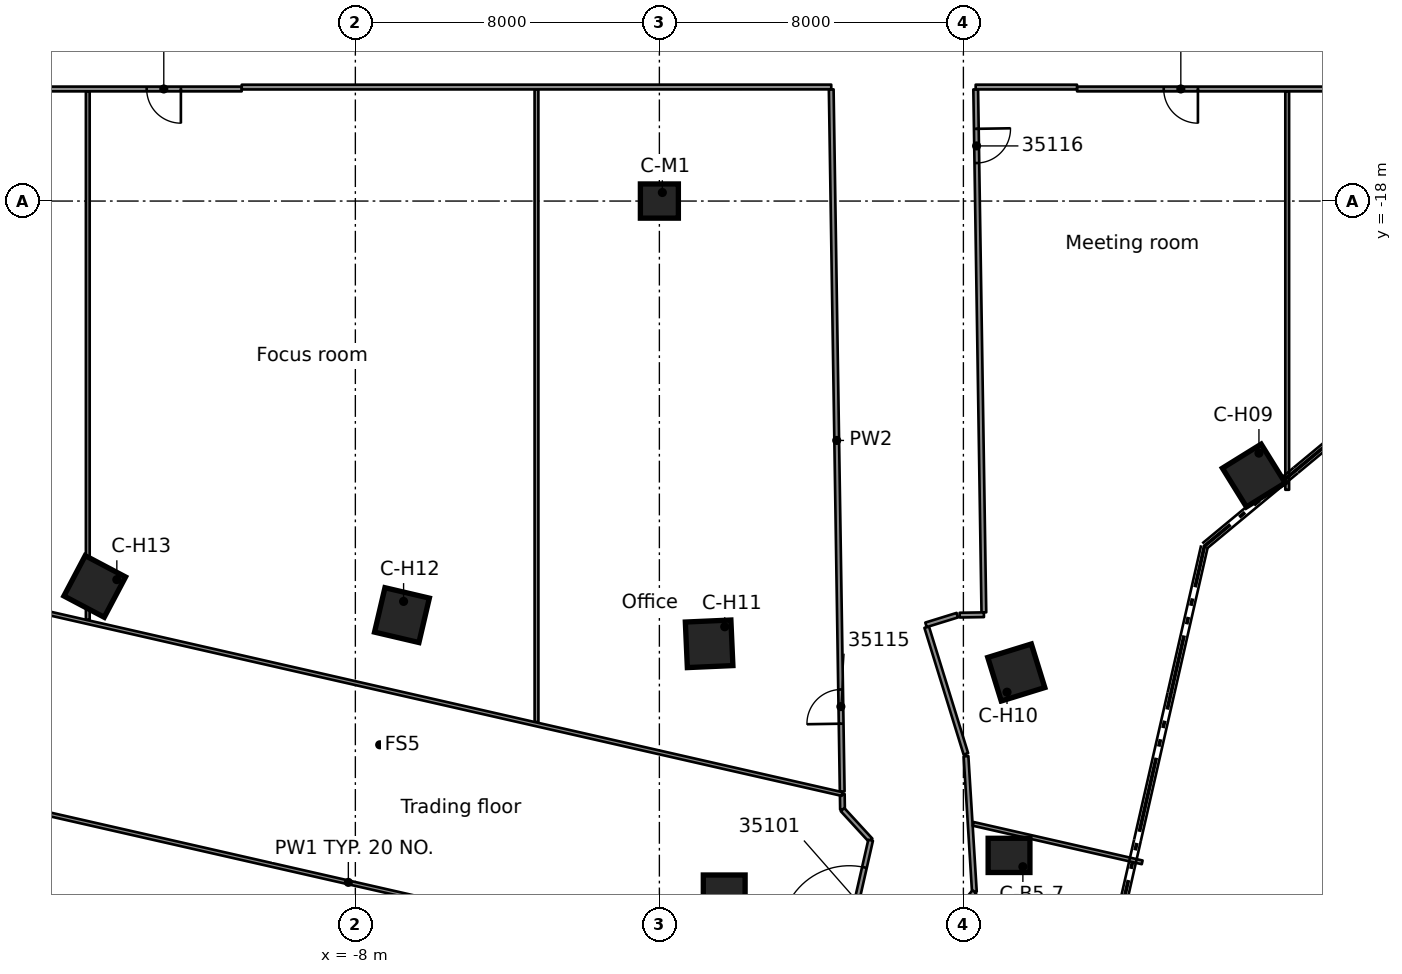
"""IFC4 building model, lengths in metres.
Left out: names, types, materials, properties, quantities, classifications, styles, units other than length and angle.
Written with IfcOpenShell. Run it as: python <this file> out.ifc"""

import sys

from ifc_helpers import new_model, si_unit, direction, frame, frame_2d, origin, origin_2d, place, context, subcontext, project, spatial, rectangle, extrude, element, fill, save


model = new_model("IFC4")
c1 = context("Model", 3, precision=1e-05, world=origin(), true_north=direction((0.0, 1.0)))
c2 = subcontext(c1, "Body", "Model", "MODEL_VIEW")
j1 = project(units=[si_unit("LENGTHUNIT", "METRE"), si_unit("PLANEANGLEUNIT", "RADIAN")], contexts=[c1])
p1 = place(None, origin())
s1 = spatial("IfcSite", under=j1, at=p1, CompositionType="ELEMENT")
p2 = place(p1, origin())
s2 = spatial("IfcBuilding", under=s1, at=p2, CompositionType="ELEMENT")
p3 = place(p2, frame((0.0, 0.0, 170.6)))
s3 = spatial("IfcBuildingStorey", under=s2, at=p3, CompositionType="ELEMENT", Elevation=170.6)
for number, where, z_axis, x_axis in (
    (1, (1.706, -36.183, 0.0), (0.0, 0.0, 1.0), (1.0, 0.0, 0.0)),
    (2, (9.201, -35.217, 0.0), (0.0, 0.0, 1.0), (1.0, 0.0, 0.0)),
):
    element("IfcColumn", number, at=place(p3, frame(where, z_axis=z_axis, x_axis=x_axis)), inside=s3, PredefinedType="COLUMN", context=c2, shape_type="SweptSolid", body=[
        extrude(rectangle(XDim=1.1, YDim=0.9, at=origin_2d()), origin(), (0.0, 0.0, 1.0), 3.5),
    ])
for number, where, z_axis, x_axis in (
    (3, (15.642, -25.222, 0.0), (0.0, 0.0, 1.0), (0.527, -0.85, 0.0)),
    (4, (9.392, -30.405, 0.0), (0.0, 0.0, 1.0), (0.295, -0.955, 0.0)),
    (5, (1.309, -29.65, 0.0), (0.0, 0.0, 1.0), (0.044, -0.999, 0.0)),
    (6, (-6.774, -28.895, 0.0), (0.0, 0.0, 1.0), (-0.228, -0.974, 0.0)),
    (7, (-14.858, -28.141, 0.0), (0.0, 0.0, 1.0), (-0.467, -0.884, 0.0)),
):
    element("IfcColumn", number, at=place(p3, frame(where, z_axis=z_axis, x_axis=x_axis)), inside=s3, PredefinedType="COLUMN", context=c2, shape_type="SweptSolid", body=[
        extrude(rectangle(XDim=1.2, YDim=1.2, at=origin_2d()), origin(), (0.0, 0.0, 1.0), 3.5),
    ])
p4 = place(p3, frame((0.0, -18.0, 0.0), z_axis=(0.0, 0.0, 1.0), x_axis=(1.0, 0.0, 0.0)))
e8 = element("IfcColumn", 8, at=p4, inside=s3, PredefinedType="COLUMN", context=c2, shape_type="SweptSolid", body=[
    extrude(rectangle(XDim=1.0, YDim=0.9, at=origin_2d()), origin(), (0.0, 0.0, 1.0), 3.5),
])
p5 = place(p3, frame((-3.234, -15.062, 0.0), z_axis=(0.0, 0.0, 1.0), x_axis=(5.8673394e-05, -0.999999998279, 0.0)))
e9 = element("IfcWall", 9, at=p5, inside=s3, PredefinedType="PARTITIONING", context=c2, shape_type="SweptSolid", body=[
    extrude(rectangle(XDim=16.644, YDim=0.1, at=frame_2d((8.322, 0.0))), origin(), (0.0, 0.0, 1.0), 3.06),
])
p6 = place(p3, frame((4.813, -33.602, 0.0), z_axis=(0.0, 0.0, 1.0), x_axis=(0.014888165056, -0.999889165128, 0.0)))
e10 = element("IfcWall", 10, at=p6, inside=s3, PredefinedType="PARTITIONING", context=c2, shape_type="SweptSolid", body=[
    extrude(rectangle(XDim=0.41, YDim=0.125, at=frame_2d((0.205, 0.0))), origin(), (0.0, 0.0, 1.0), 3.06),
])
p7 = place(p3, frame((4.811, -33.535, 0.0), z_axis=(0.0, 0.0, 1.0), x_axis=(-0.015646006357, 0.999877593751, 0.0)))
e11 = element("IfcWall", 11, at=p7, inside=s3, PredefinedType="PARTITIONING", context=c2, shape_type="SweptSolid", body=[
    extrude(rectangle(XDim=18.475, YDim=0.125, at=frame_2d((9.238, 0.0))), origin(), (0.0, 0.0, 1.0), 3.06),
])
p8 = place(p7, frame((1.783, 0.0, 0.0)))
e12 = element("IfcOpeningElement", 12, at=p8, cuts=e11, PredefinedType="OPENING", context=c2, shape_type="SweptSolid", body=[
    extrude(rectangle(XDim=0.9, YDim=2.1, at=frame_2d((0.45, 1.05))), frame((0.0, 0.073, 0.0), z_axis=(0.0, -1.0, 0.0), x_axis=(1.0, 0.0, 0.0)), (0.0, 0.0, 1.0), 0.145),
])
p9 = place(p3, frame((8.324, -15.062, 0.0), z_axis=(0.0, 0.0, 1.0), x_axis=(0.015628358081, -0.999877869754, 0.0)))
e13 = element("IfcWall", 13, at=p9, inside=s3, PredefinedType="PARTITIONING", context=c2, shape_type="SweptSolid", body=[
    extrude(rectangle(XDim=13.763, YDim=0.125, at=frame_2d((6.881, 0.0))), origin(), (0.0, 0.0, 1.0), 3.06),
])
p10 = place(p9, frame((1.038, 0.0, 0.0)))
e14 = element("IfcOpeningElement", 14, at=p10, cuts=e13, PredefinedType="OPENING", context=c2, shape_type="SweptSolid", body=[
    extrude(rectangle(XDim=0.9, YDim=2.1, at=frame_2d((0.45, 1.05))), frame((0.0, 0.073, 0.0), z_axis=(0.0, -1.0, 0.0), x_axis=(1.0, 0.0, 0.0)), (0.0, 0.0, 1.0), 0.145),
])
p11 = place(p3, frame((8.069, -32.609, 0.0), z_axis=(0.0, 0.0, 1.0), x_axis=(0.061565744527, -0.998103030303, 0.0)))
e15 = element("IfcWall", 15, at=p11, inside=s3, PredefinedType="PARTITIONING", context=c2, shape_type="SweptSolid", body=[
    extrude(rectangle(XDim=3.573, YDim=0.125, at=frame_2d((1.787, 0.0))), origin(), (0.0, 0.0, 1.0), 3.06),
])
p12 = place(p3, frame((7.034, -29.211, 0.0), z_axis=(0.0, 0.0, 1.0), x_axis=(0.295358504145, -0.955386494582, 0.0)))
e16 = element("IfcWall", 16, at=p12, inside=s3, PredefinedType="PARTITIONING", context=c2, shape_type="SweptSolid", body=[
    extrude(rectangle(XDim=3.491, YDim=0.125, at=frame_2d((1.745, 0.0))), origin(), (0.0, 0.0, 1.0), 3.06),
])
p13 = place(p3, frame((-20.951, -33.019, 0.0), z_axis=(0.0, 0.0, 1.0), x_axis=(0.975025683381, -0.222092135715, 0.0)))
e17 = element("IfcWall", 17, at=p13, inside=s3, PredefinedType="PARTITIONING", context=c2, shape_type="SweptSolid", body=[
    extrude(rectangle(XDim=26.187, YDim=0.1, at=frame_2d((13.094, 0.0))), origin(), (0.0, 0.0, 1.0), 3.06),
])
p14 = place(p3, frame((-19.806, -27.994, 0.0), z_axis=(0.0, 0.0, 1.0), x_axis=(0.975005878079, -0.222179066769, 0.0)))
e18 = element("IfcWall", 18, at=p14, inside=s3, PredefinedType="PARTITIONING", context=c2, shape_type="SweptSolid", body=[
    extrude(rectangle(XDim=25.246, YDim=0.1, at=frame_2d((12.623, 0.0))), origin(), (0.0, 0.0, 1.0), 3.06),
])
p15 = place(p3, frame((8.256, -34.387, 0.0), z_axis=(0.0, 0.0, 1.0), x_axis=(0.975047109618, -0.221998049597, 0.0)))
e19 = element("IfcWall", 19, at=p15, inside=s3, PredefinedType="PARTITIONING", context=c2, shape_type="SweptSolid", body=[
    extrude(rectangle(XDim=4.563, YDim=0.1, at=frame_2d((2.281, 0.0))), origin(), (0.0, 0.0, 1.0), 3.06),
])
p16 = place(p3, frame((-10.991, -15.051, 0.0), z_axis=(0.0, 0.0, 1.0), x_axis=(-1.0, 0.0, 0.0)))
e20 = element("IfcWall", 20, at=p16, inside=s3, PredefinedType="PARTITIONING", context=c2, shape_type="SweptSolid", body=[
    extrude(rectangle(XDim=8.01, YDim=0.125, at=frame_2d((4.005, 0.0))), origin(), (0.0, 0.0, 1.0), 3.06),
])
p17 = place(p16, frame((1.6, 0.0, 0.0)))
e21 = element("IfcOpeningElement", 21, at=p17, cuts=e20, PredefinedType="OPENING", context=c2, shape_type="SweptSolid", body=[
    extrude(rectangle(XDim=0.9, YDim=2.1, at=frame_2d((0.45, 1.05))), frame((0.0, 0.073, 0.0), z_axis=(0.0, -1.0, 0.0), x_axis=(1.0, 0.0, 0.0)), (0.0, 0.0, 1.0), 0.145),
])
p18 = place(p3, frame((21.988, -15.051, 0.0), z_axis=(0.0, 0.0, 1.0), x_axis=(-1.0, 0.0, 0.0)))
e22 = element("IfcWall", 22, at=p18, inside=s3, PredefinedType="PARTITIONING", context=c2, shape_type="SweptSolid", body=[
    extrude(rectangle(XDim=10.997, YDim=0.125, at=frame_2d((5.499, 0.0))), origin(), (0.0, 0.0, 1.0), 3.06),
])
p19 = place(p18, frame((7.816, 0.0, 0.0)))
e23 = element("IfcOpeningElement", 23, at=p19, cuts=e22, PredefinedType="OPENING", context=c2, shape_type="SweptSolid", body=[
    extrude(rectangle(XDim=0.9, YDim=2.1, at=frame_2d((0.45, 1.05))), frame((0.0, 0.073, 0.0), z_axis=(0.0, -1.0, 0.0), x_axis=(1.0, 0.0, 0.0)), (0.0, 0.0, 1.0), 0.145),
])
p20 = place(p18, frame((2.288, 0.0, 0.0)))
e24 = element("IfcOpeningElement", 24, at=p20, cuts=e22, PredefinedType="OPENING", context=c2, shape_type="SweptSolid", body=[
    extrude(rectangle(XDim=0.9, YDim=2.1, at=frame_2d((0.45, 1.05))), frame((0.0, 0.073, 0.0), z_axis=(0.0, -1.0, 0.0), x_axis=(1.0, 0.0, 0.0)), (0.0, 0.0, 1.0), 0.145),
])
p21 = place(p3, frame((-10.99, -15.001, 0.0), z_axis=(0.0, 0.0, 1.0), x_axis=(0.999999992074, 0.000125902959, 0.0)))
e25 = element("IfcWall", 25, at=p21, inside=s3, PredefinedType="PARTITIONING", context=c2, shape_type="SweptSolid", body=[
    extrude(rectangle(XDim=15.513, YDim=0.125, at=frame_2d((7.756, 0.0))), origin(), (0.0, 0.0, 1.0), 3.06),
])
p22 = place(p3, frame((8.323, -15.0, 0.0), z_axis=(0.0, 0.0, 1.0), x_axis=(0.999999932961, -0.000366166215, 0.0)))
e26 = element("IfcWall", 26, at=p22, inside=s3, PredefinedType="PARTITIONING", context=c2, shape_type="SweptSolid", body=[
    extrude(rectangle(XDim=2.667, YDim=0.125, at=frame_2d((1.333, 0.0))), origin(), (0.0, 0.0, 1.0), 3.06),
])
p23 = place(p3, frame((7.613, -36.966, 0.0), z_axis=(0.0, 0.0, 1.0), x_axis=(0.649689309886, 0.760199842554, 0.0)))
e27 = element("IfcWall", 27, at=p23, inside=s3, PredefinedType="PARTITIONING", context=c2, shape_type="SweptSolid", body=[
    extrude(rectangle(XDim=1.041, YDim=0.125, at=frame_2d((0.52, 0.0))), origin(), (0.0, 0.0, 1.0), 3.06),
])
p24 = place(p3, frame((7.902, -28.895, 0.0), z_axis=(0.0, 0.0, 1.0), x_axis=(0.999876922486, 0.015688845703, 0.0)))
e28 = element("IfcWall", 28, at=p24, inside=s3, PredefinedType="PARTITIONING", context=c2, shape_type="SweptSolid", body=[
    extrude(rectangle(XDim=0.638, YDim=0.125, at=frame_2d((0.319, 0.0))), origin(), (0.0, 0.0, 1.0), 3.06),
])
p25 = place(p3, frame((4.82, -34.013, 0.0), z_axis=(0.0, 0.0, 1.0), x_axis=(0.676189811414, -0.736727452278, 0.0)))
e29 = element("IfcWall", 29, at=p25, inside=s3, PredefinedType="PARTITIONING", context=c2, shape_type="SweptSolid", body=[
    extrude(rectangle(XDim=1.093, YDim=0.125, at=frame_2d((0.546, 0.0))), origin(), (0.0, 0.0, 1.0), 3.06),
])
p26 = place(p3, frame((7.016, -29.151, 0.0), z_axis=(0.0, 0.0, 1.0), x_axis=(0.955337275677, 0.295517663943, 0.0)))
e30 = element("IfcWall", 30, at=p26, inside=s3, PredefinedType="PARTITIONING", context=c2, shape_type="SweptSolid", body=[
    extrude(rectangle(XDim=0.863, YDim=0.125, at=frame_2d((0.431, 0.0))), origin(), (0.0, 0.0, 1.0), 3.06),
])
p27 = place(p3, frame((3.166, -45.332, 0.0), z_axis=(0.0, 0.0, 1.0), x_axis=(0.221933270953, 0.975061856112, 0.0)))
e31 = element("IfcWall", 31, at=p27, inside=s3, PredefinedType="PARTITIONING", context=c2, shape_type="SweptSolid", body=[
    extrude(rectangle(XDim=10.783, YDim=0.125, at=frame_2d((5.391, 0.0))), origin(), (0.0, 0.0, 1.0), 3.06),
])
p28 = place(p27, frame((8.249, 0.0, 0.0)))
e32 = element("IfcOpeningElement", 32, at=p28, cuts=e31, PredefinedType="OPENING", context=c2, shape_type="SweptSolid", body=[
    extrude(rectangle(XDim=1.8, YDim=2.1, at=frame_2d((0.9, 1.05))), frame((0.0, 0.073, 0.0), z_axis=(0.0, -1.0, 0.0), x_axis=(1.0, 0.0, 0.0)), (0.0, 0.0, 1.0), 0.145),
])
p29 = place(p27, frame((3.596, 0.0, 0.0)))
e33 = element("IfcOpeningElement", 33, at=p29, cuts=e31, PredefinedType="OPENING", context=c2, shape_type="SweptSolid", body=[
    extrude(rectangle(XDim=0.9, YDim=2.1, at=frame_2d((0.45, 1.05))), frame((0.0, 0.073, 0.0), z_axis=(0.0, -1.0, 0.0), x_axis=(1.0, 0.0, 0.0)), (0.0, 0.0, 1.0), 0.145),
])
p30 = place(p3, frame((16.521, -25.597, 0.0), z_axis=(0.0, 0.0, 1.0), x_axis=(0.0, 1.0, 0.0)))
e34 = element("IfcWall", 34, at=p30, inside=s3, PredefinedType="PARTITIONING", context=c2, shape_type="SweptSolid", body=[
    extrude(rectangle(XDim=10.483, YDim=0.1, at=frame_2d((5.241, 0.0))), origin(), (0.0, 0.0, 1.0), 3.06),
])
p31 = place(p3, frame((-15.041, -29.016, 0.0), z_axis=(0.0, 0.0, 1.0), x_axis=(0.0, 1.0, 0.0)))
e35 = element("IfcWall", 35, at=p31, inside=s3, PredefinedType="PARTITIONING", context=c2, shape_type="SweptSolid", body=[
    extrude(rectangle(XDim=13.902, YDim=0.1, at=frame_2d((6.951, 0.0))), origin(), (0.0, 0.0, 1.0), 3.06),
])
p32 = place(p28, origin())
e36 = element("IfcDoor", 36, at=p32, inside=s3, OperationType="DOUBLE_DOOR_SINGLE_SWING", PredefinedType="DOOR", context=c2, shape_type="SweptSolid", body=[
    extrude(rectangle(XDim=1.8, YDim=2.1, at=frame_2d((0.9, 1.05))), frame((0.0, 0.025, 0.0), z_axis=(0.0, -1.0, 0.0), x_axis=(1.0, 0.0, 0.0)), (0.0, 0.0, 1.0), 0.05),
])
fill(e32, e36)
p33 = place(p17, origin())
e37 = element("IfcDoor", 37, at=p33, inside=s3, OperationType="SINGLE_SWING_LEFT", PredefinedType="DOOR", context=c2, shape_type="SweptSolid", body=[
    extrude(rectangle(XDim=0.9, YDim=2.1, at=frame_2d((0.45, 1.05))), frame((0.0, 0.025, 0.0), z_axis=(0.0, -1.0, 0.0), x_axis=(1.0, 0.0, 0.0)), (0.0, 0.0, 1.0), 0.05),
])
fill(e21, e37)
p34 = place(p8, origin())
e38 = element("IfcDoor", 38, at=p34, inside=s3, OperationType="SINGLE_SWING_LEFT", PredefinedType="DOOR", context=c2, shape_type="SweptSolid", body=[
    extrude(rectangle(XDim=0.9, YDim=2.1, at=frame_2d((0.45, 1.05))), frame((0.0, 0.025, 0.0), z_axis=(0.0, -1.0, 0.0), x_axis=(1.0, 0.0, 0.0)), (0.0, 0.0, 1.0), 0.05),
])
fill(e12, e38)
p35 = place(p10, origin())
e39 = element("IfcDoor", 39, at=p35, inside=s3, OperationType="SINGLE_SWING_LEFT", PredefinedType="DOOR", context=c2, shape_type="SweptSolid", body=[
    extrude(rectangle(XDim=0.9, YDim=2.1, at=frame_2d((0.45, 1.05))), frame((0.0, 0.025, 0.0), z_axis=(0.0, -1.0, 0.0), x_axis=(1.0, 0.0, 0.0)), (0.0, 0.0, 1.0), 0.05),
])
fill(e14, e39)
p36 = place(p19, origin())
e40 = element("IfcDoor", 40, at=p36, inside=s3, OperationType="SINGLE_SWING_RIGHT", PredefinedType="DOOR", context=c2, shape_type="SweptSolid", body=[
    extrude(rectangle(XDim=0.9, YDim=2.1, at=frame_2d((0.45, 1.05))), frame((0.0, 0.025, 0.0), z_axis=(0.0, -1.0, 0.0), x_axis=(1.0, 0.0, 0.0)), (0.0, 0.0, 1.0), 0.05),
])
fill(e23, e40)
save(model, sys.argv[1])
